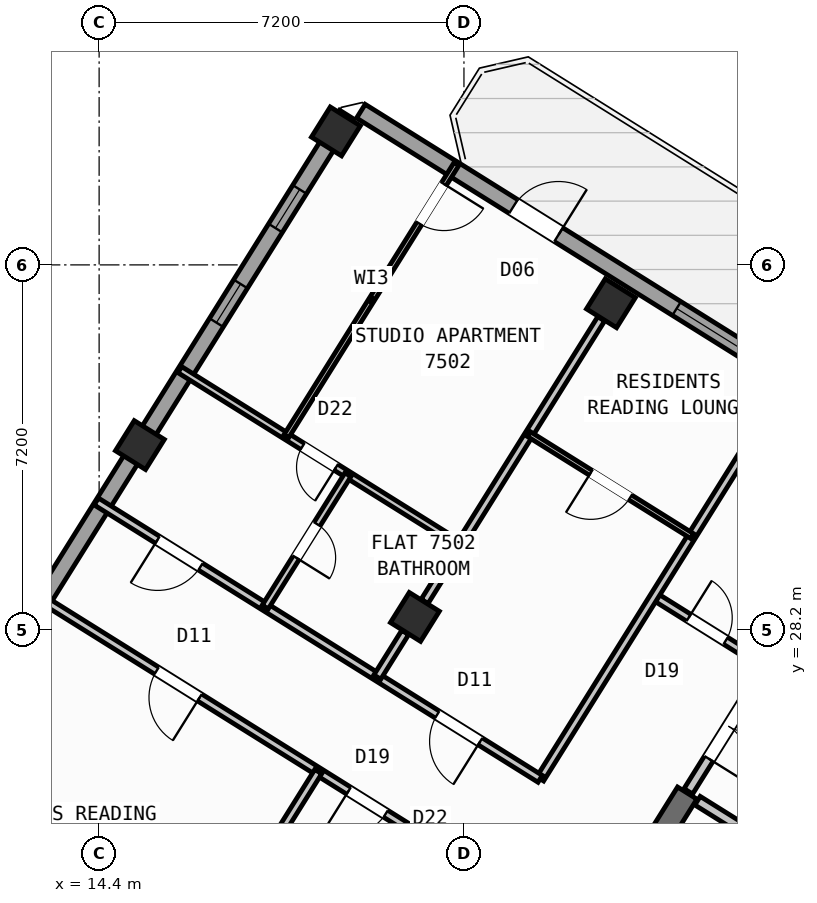
"""IFC4 building model, lengths in metres.
Left out: names, types, materials, properties, quantities, classifications, styles, units other than length and angle.
Written with IfcOpenShell. Run it as: python <this file> out.ifc"""

import sys

from ifc_helpers import new_model, si_unit, direction, frame, frame_2d, origin, origin_2d, place, context, subcontext, project, spatial, rectangle, hollow_rectangle, extrude, source, transform, mapped, element, fill, save


model = new_model("IFC4")
c1 = context("Model", 3, precision=1e-05, world=origin(), true_north=direction((0.0, 1.0)))
c2 = subcontext(c1, "Body", "Model", "MODEL_VIEW")
j1 = project(units=[si_unit("LENGTHUNIT", "METRE"), si_unit("PLANEANGLEUNIT", "RADIAN")], contexts=[c1])
p1 = place(None, origin())
s1 = spatial("IfcSite", under=j1, at=p1, CompositionType="ELEMENT")
p2 = place(p1, origin())
s2 = spatial("IfcBuilding", under=s1, at=p2, CompositionType="ELEMENT")
p3 = place(p2, frame((0.0, 0.0, 295.2)))
s3 = spatial("IfcBuildingStorey", under=s2, at=p3, CompositionType="ELEMENT", Elevation=295.2)
p4 = place(p3, frame((26.007, 24.976, 0.0), z_axis=(0.0, 0.0, 1.0), x_axis=(-0.529931155655, -0.848040665456, 0.0)))
e1 = element("IfcWall", 1, at=p4, inside=s3, PredefinedType="SHEAR", context=c2, shape_type="SweptSolid", body=[
    extrude(rectangle(XDim=6.475, YDim=0.45, at=frame_2d((3.238, 0.0))), origin(), (0.0, 0.0, 1.0), 3.32),
])
m1 = source(origin(), c2, "Body", "SweptSolid", [
    extrude(hollow_rectangle(XDim=0.7, YDim=0.7, WallThickness=0.028, at=origin_2d()), origin(), (0.0, 0.0, 1.0), 3.6),
])
for number, where, z_axis, x_axis in (
    (2, (24.5, 34.643, 0.0), (0.0, 0.0, 1.0), (-0.848, 0.53, 0.0)),
    (3, (20.632, 28.452, 0.0), (0.0, 0.0, 1.0), (-0.848, 0.53, 0.0)),
    (4, (19.073, 38.034, 0.0), (0.0, 0.0, 1.0), (-0.848, 0.53, 0.0)),
    (5, (15.205, 31.844, 0.0), (0.0, 0.0, 1.0), (-0.848, 0.53, 0.0)),
):
    element("IfcColumn", number, at=place(p3, frame(where, z_axis=z_axis, x_axis=x_axis)), inside=s3, PredefinedType="COLUMN", context=c2, shape_type="MappedRepresentation", body=[
        mapped(m1, transform((0.0, 0.0, 0.0), scale=1.0)),
    ])
p5 = place(p3, frame((7.842, 20.061, 0.0), z_axis=(0.0, 0.0, 1.0), x_axis=(0.529915577903, 0.84805039962, 0.0)))
e6 = element("IfcWall", 6, at=p5, inside=s3, PredefinedType="STANDARD", context=c2, shape_type="SweptSolid", body=[
    extrude(rectangle(XDim=21.587, YDim=0.32, at=frame_2d((10.794, 0.0))), origin(), (0.0, 0.0, 1.0), 3.32),
])
p6 = place(p5, frame((1.368, 0.0, 0.9)))
e7 = element("IfcOpeningElement", 7, at=p6, cuts=e6, PredefinedType="OPENING", context=c2, shape_type="SweptSolid", body=[
    extrude(rectangle(XDim=1.65, YDim=1.45, at=frame_2d((0.825, 0.725))), frame((0.0, 0.17, 0.0), z_axis=(0.0, -1.0, 0.0), x_axis=(1.0, 0.0, 0.0)), (0.0, 0.0, 1.0), 0.34),
])
p7 = place(p5, frame((4.71, 0.0, 1.0)))
e8 = element("IfcOpeningElement", 8, at=p7, cuts=e6, PredefinedType="OPENING", context=c2, shape_type="SweptSolid", body=[
    extrude(rectangle(XDim=0.9, YDim=1.25, at=frame_2d((0.45, 0.625))), frame((0.0, 0.17, 0.0), z_axis=(0.0, -1.0, 0.0), x_axis=(1.0, 0.0, 0.0)), (0.0, 0.0, 1.0), 0.34),
])
p8 = place(p5, frame((7.554, 0.0, 0.95)))
e9 = element("IfcOpeningElement", 9, at=p8, cuts=e6, PredefinedType="OPENING", context=c2, shape_type="SweptSolid", body=[
    extrude(rectangle(XDim=1.95, YDim=1.35, at=frame_2d((0.975, 0.675))), frame((0.0, 0.17, 0.0), z_axis=(0.0, -1.0, 0.0), x_axis=(1.0, 0.0, 0.0)), (0.0, 0.0, 1.0), 0.34),
])
p9 = place(p5, frame((16.744, 0.0, 1.0)))
e10 = element("IfcOpeningElement", 10, at=p9, cuts=e6, PredefinedType="OPENING", context=c2, shape_type="SweptSolid", body=[
    extrude(rectangle(XDim=0.9, YDim=1.25, at=frame_2d((0.45, 0.625))), frame((0.0, 0.17, 0.0), z_axis=(0.0, -1.0, 0.0), x_axis=(1.0, 0.0, 0.0)), (0.0, 0.0, 1.0), 0.34),
])
p10 = place(p5, frame((18.944, 0.0, 1.0)))
e11 = element("IfcOpeningElement", 11, at=p10, cuts=e6, PredefinedType="OPENING", context=c2, shape_type="SweptSolid", body=[
    extrude(rectangle(XDim=0.9, YDim=1.25, at=frame_2d((0.45, 0.625))), frame((0.0, 0.17, 0.0), z_axis=(0.0, -1.0, 0.0), x_axis=(1.0, 0.0, 0.0)), (0.0, 0.0, 1.0), 0.34),
])
p11 = place(p3, frame((19.566, 38.434, 0.0), z_axis=(0.0, 0.0, 1.0), x_axis=(0.84804567626, -0.529923136858, 0.0)))
e12 = element("IfcWall", 12, at=p11, inside=s3, PredefinedType="STANDARD", context=c2, shape_type="SweptSolid", body=[
    extrude(rectangle(XDim=25.188, YDim=0.32, at=frame_2d((12.594, 0.0))), origin(), (0.0, 0.0, 1.0), 3.32),
])
p12 = place(p11, frame((3.55, 0.0, 0.0)))
e13 = element("IfcOpeningElement", 13, at=p12, cuts=e12, PredefinedType="OPENING", context=c2, shape_type="SweptSolid", body=[
    extrude(rectangle(XDim=1.05, YDim=2.15, at=frame_2d((0.525, 1.075))), frame((0.0, 0.17, 0.0), z_axis=(0.0, -1.0, 0.0), x_axis=(1.0, 0.0, 0.0)), (0.0, 0.0, 1.0), 0.34),
])
p13 = place(p11, frame((7.349, 0.0, 0.9)))
e14 = element("IfcOpeningElement", 14, at=p13, cuts=e12, PredefinedType="OPENING", context=c2, shape_type="SweptSolid", body=[
    extrude(rectangle(XDim=1.65, YDim=1.45, at=frame_2d((0.825, 0.725))), frame((0.0, 0.17, 0.0), z_axis=(0.0, -1.0, 0.0), x_axis=(1.0, 0.0, 0.0)), (0.0, 0.0, 1.0), 0.34),
])
p14 = place(p11, frame((10.754, 0.0, 1.0)))
e15 = element("IfcOpeningElement", 15, at=p14, cuts=e12, PredefinedType="OPENING", context=c2, shape_type="SweptSolid", body=[
    extrude(rectangle(XDim=0.9, YDim=1.25, at=frame_2d((0.45, 0.625))), frame((0.0, 0.17, 0.0), z_axis=(0.0, -1.0, 0.0), x_axis=(1.0, 0.0, 0.0)), (0.0, 0.0, 1.0), 0.34),
])
p15 = place(p11, frame((15.169, 0.0, 0.95)))
e16 = element("IfcOpeningElement", 16, at=p15, cuts=e12, PredefinedType="OPENING", context=c2, shape_type="SweptSolid", body=[
    extrude(rectangle(XDim=1.95, YDim=1.35, at=frame_2d((0.975, 0.675))), frame((0.0, 0.17, 0.0), z_axis=(0.0, -1.0, 0.0), x_axis=(1.0, 0.0, 0.0)), (0.0, 0.0, 1.0), 0.34),
])
p16 = place(p11, frame((20.869, 0.0, 0.95)))
e17 = element("IfcOpeningElement", 17, at=p16, cuts=e12, PredefinedType="OPENING", context=c2, shape_type="SweptSolid", body=[
    extrude(rectangle(XDim=1.95, YDim=1.35, at=frame_2d((0.975, 0.675))), frame((0.0, 0.17, 0.0), z_axis=(0.0, -1.0, 0.0), x_axis=(1.0, 0.0, 0.0)), (0.0, 0.0, 1.0), 0.34),
])
p17 = place(p3, frame((31.525, 21.504, 0.0), z_axis=(0.0, 0.0, 1.0), x_axis=(-0.848042066329, 0.529928913853, 0.0)))
e18 = element("IfcWall", 18, at=p17, inside=s3, PredefinedType="STANDARD", context=c2, shape_type="SweptSolid", body=[
    extrude(rectangle(XDim=6.268, YDim=0.2, at=frame_2d((3.134, 0.0))), origin(), (0.0, 0.0, 1.0), 3.31),
])
p18 = place(p17, frame((4.4, 0.0, 0.0)))
e19 = element("IfcOpeningElement", 19, at=p18, cuts=e18, PredefinedType="OPENING", context=c2, shape_type="SweptSolid", body=[
    extrude(rectangle(XDim=0.86, YDim=2.05, at=frame_2d((0.43, 1.025))), frame((0.0, 0.11, 0.0), z_axis=(0.0, -1.0, 0.0), x_axis=(1.0, 0.0, 0.0)), (0.0, 0.0, 1.0), 0.22),
])
p19 = place(p17, frame((0.35, 0.0, 0.0)))
e20 = element("IfcOpeningElement", 20, at=p19, cuts=e18, PredefinedType="OPENING", context=c2, shape_type="SweptSolid", body=[
    extrude(rectangle(XDim=0.86, YDim=2.05, at=frame_2d((0.43, 1.025))), frame((0.0, 0.11, 0.0), z_axis=(0.0, -1.0, 0.0), x_axis=(1.0, 0.0, 0.0)), (0.0, 0.0, 1.0), 0.22),
])
p20 = place(p3, frame((27.596, 27.52, 0.0), z_axis=(0.0, 0.0, 1.0), x_axis=(-0.529865479138, -0.848081702443, 0.0)))
e21 = element("IfcWall", 21, at=p20, inside=s3, PredefinedType="STANDARD", context=c2, shape_type="SweptSolid", body=[
    extrude(rectangle(XDim=2.96, YDim=0.2, at=frame_2d((1.48, 0.0))), origin(), (0.0, 0.0, 1.0), 3.31),
])
p21 = place(p20, frame((0.7, 0.0, 0.0)))
e22 = element("IfcOpeningElement", 22, at=p21, cuts=e21, PredefinedType="OPENING", context=c2, shape_type="SweptSolid", body=[
    extrude(rectangle(XDim=1.5, YDim=2.15, at=frame_2d((0.75, 1.075))), frame((0.0, 0.11, 0.0), z_axis=(0.0, -1.0, 0.0), x_axis=(1.0, 0.0, 0.0)), (0.0, 0.0, 1.0), 0.22),
])
p22 = place(p3, frame((27.57, 27.478, 0.0), z_axis=(0.0, 0.0, 1.0), x_axis=(-0.848050851465, 0.529914854792, 0.0)))
e23 = element("IfcWall", 23, at=p22, inside=s3, PredefinedType="PARTITIONING", context=c2, shape_type="SweptSolid", body=[
    extrude(rectangle(XDim=2.61, YDim=0.16, at=frame_2d((1.305, 0.0))), origin(), (0.0, 0.0, 1.0), 3.31),
])
p23 = place(p22, frame((0.95, 0.0, 0.0)))
e24 = element("IfcOpeningElement", 24, at=p23, cuts=e23, PredefinedType="OPENING", context=c2, shape_type="SweptSolid", body=[
    extrude(rectangle(XDim=0.86, YDim=2.05, at=frame_2d((0.43, 1.025))), frame((0.0, 0.09, 0.0), z_axis=(0.0, -1.0, 0.0), x_axis=(1.0, 0.0, 0.0)), (0.0, 0.0, 1.0), 0.18),
])
p24 = place(p3, frame((27.953, 33.016, 0.0), z_axis=(0.0, 0.0, 1.0), x_axis=(-0.529903001606, -0.848058257957, 0.0)))
e25 = element("IfcWall", 25, at=p24, inside=s3, PredefinedType="PARTITIONING", context=c2, shape_type="SweptSolid", body=[
    extrude(rectangle(XDim=9.15, YDim=0.16, at=frame_2d((4.575, 0.0))), origin(), (0.0, 0.0, 1.0), 3.31),
])
p25 = place(p3, frame((23.104, 25.256, 0.0), z_axis=(0.0, 0.0, 1.0), x_axis=(-0.848043444964, 0.529926707624, 0.0)))
e26 = element("IfcWall", 26, at=p25, inside=s3, PredefinedType="PARTITIONING", context=c2, shape_type="SweptSolid", body=[
    extrude(rectangle(XDim=10.33, YDim=0.16, at=frame_2d((5.165, 0.0))), origin(), (0.0, 0.0, 1.0), 3.31),
])
p26 = place(p25, frame((1.395, 0.0, 0.0)))
e27 = element("IfcOpeningElement", 27, at=p26, cuts=e26, PredefinedType="OPENING", context=c2, shape_type="SweptSolid", body=[
    extrude(rectangle(XDim=1.0, YDim=2.1, at=frame_2d((0.5, 1.05))), frame((0.0, 0.09, 0.0), z_axis=(0.0, -1.0, 0.0), x_axis=(1.0, 0.0, 0.0)), (0.0, 0.0, 1.0), 0.18),
])
p27 = place(p25, frame((7.904, 0.0, 0.0)))
e28 = element("IfcOpeningElement", 28, at=p27, cuts=e26, PredefinedType="OPENING", context=c2, shape_type="SweptSolid", body=[
    extrude(rectangle(XDim=1.0, YDim=2.1, at=frame_2d((0.5, 1.05))), frame((0.0, 0.09, 0.0), z_axis=(0.0, -1.0, 0.0), x_axis=(1.0, 0.0, 0.0)), (0.0, 0.0, 1.0), 0.18),
])
p28 = place(p3, frame((21.938, 23.391, 0.0), z_axis=(0.0, 0.0, 1.0), x_axis=(-0.848050081784, 0.529916086552, 0.0)))
e29 = element("IfcWall", 29, at=p28, inside=s3, PredefinedType="PARTITIONING", context=c2, shape_type="SweptSolid", body=[
    extrude(rectangle(XDim=10.33, YDim=0.16, at=frame_2d((5.165, 0.0))), origin(), (0.0, 0.0, 1.0), 3.31),
])
p29 = place(p28, frame((2.22, 0.0, 0.0)))
e30 = element("IfcOpeningElement", 30, at=p29, cuts=e29, PredefinedType="OPENING", context=c2, shape_type="SweptSolid", body=[
    extrude(rectangle(XDim=0.86, YDim=2.05, at=frame_2d((0.43, 1.025))), frame((0.0, 0.09, 0.0), z_axis=(0.0, -1.0, 0.0), x_axis=(1.0, 0.0, 0.0)), (0.0, 0.0, 1.0), 0.18),
])
p30 = place(p28, frame((6.55, 0.0, 0.0)))
e31 = element("IfcOpeningElement", 31, at=p30, cuts=e29, PredefinedType="OPENING", context=c2, shape_type="SweptSolid", body=[
    extrude(rectangle(XDim=1.0, YDim=2.1, at=frame_2d((0.5, 1.05))), frame((0.0, 0.09, 0.0), z_axis=(0.0, -1.0, 0.0), x_axis=(1.0, 0.0, 0.0)), (0.0, 0.0, 1.0), 0.18),
])
p31 = place(p3, frame((18.724, 25.399, 0.0), z_axis=(0.0, 0.0, 1.0), x_axis=(-0.529952920244, -0.848027064618, 0.0)))
e32 = element("IfcWall", 32, at=p31, inside=s3, PredefinedType="PARTITIONING", context=c2, shape_type="SweptSolid", body=[
    extrude(rectangle(XDim=3.338, YDim=0.16, at=frame_2d((1.669, 0.0))), origin(), (0.0, 0.0, 1.0), 3.31),
])
p32 = place(p3, frame((24.309, 34.336, 0.0), z_axis=(0.0, 0.0, 1.0), x_axis=(-0.529895484599, -0.848062954858, 0.0)))
e33 = element("IfcWall", 33, at=p32, inside=s3, PredefinedType="PARTITIONING", context=c2, shape_type="SweptSolid", body=[
    extrude(rectangle(XDim=6.576, YDim=0.16, at=frame_2d((3.288, 0.0))), origin(), (0.0, 0.0, 1.0), 3.31),
])
p33 = place(p3, frame((20.44, 28.145, 0.0), z_axis=(0.0, 0.0, 1.0), x_axis=(-0.529977795385, -0.848011519025, 0.0)))
e34 = element("IfcWall", 34, at=p33, inside=s3, PredefinedType="PARTITIONING", context=c2, shape_type="SweptSolid", body=[
    extrude(rectangle(XDim=1.038, YDim=0.16, at=frame_2d((0.519, 0.0))), origin(), (0.0, 0.0, 1.0), 3.31),
])
p34 = place(p3, frame((26.099, 30.05, 0.0), z_axis=(0.0, 0.0, 1.0), x_axis=(-0.84803087207, 0.529946827537, 0.0)))
e35 = element("IfcWall", 35, at=p34, inside=s3, PredefinedType="PARTITIONING", context=c2, shape_type="SweptSolid", body=[
    extrude(rectangle(XDim=3.79, YDim=0.11, at=frame_2d((1.895, 0.0))), origin(), (0.0, 0.0, 1.0), 3.31),
])
p35 = place(p34, frame((1.435, 0.0, 0.0)))
e36 = element("IfcOpeningElement", 36, at=p35, cuts=e35, PredefinedType="OPENING", context=c2, shape_type="SweptSolid", body=[
    extrude(rectangle(XDim=0.92, YDim=2.08, at=frame_2d((0.46, 1.04))), frame((0.0, 0.065, 0.0), z_axis=(0.0, -1.0, 0.0), x_axis=(1.0, 0.0, 0.0)), (0.0, 0.0, 1.0), 0.13),
])
p36 = place(p3, frame((21.522, 29.877, 0.0), z_axis=(0.0, 0.0, 1.0), x_axis=(-0.848048787466, 0.529918157905, 0.0)))
e37 = element("IfcWall", 37, at=p36, inside=s3, PredefinedType="PLUMBINGWALL", context=c2, shape_type="SweptSolid", body=[
    extrude(rectangle(XDim=6.52, YDim=0.14, at=frame_2d((3.26, 0.0))), origin(), (0.0, 0.0, 1.0), 3.31),
])
p37 = place(p36, frame((2.885, 0.0, 0.0)))
e38 = element("IfcOpeningElement", 38, at=p37, cuts=e37, PredefinedType="OPENING", context=c2, shape_type="SweptSolid", body=[
    extrude(rectangle(XDim=0.78, YDim=2.05, at=frame_2d((0.39, 1.025))), frame((0.0, 0.08, 0.0), z_axis=(0.0, -1.0, 0.0), x_axis=(1.0, 0.0, 0.0)), (0.0, 0.0, 1.0), 0.16),
])
p38 = place(p3, frame((19.311, 31.259, 0.0), z_axis=(0.0, 0.0, 1.0), x_axis=(-0.52989206052, -0.848065094316, 0.0)))
e39 = element("IfcWall", 39, at=p38, inside=s3, PredefinedType="PLUMBINGWALL", context=c2, shape_type="SweptSolid", body=[
    extrude(rectangle(XDim=3.08, YDim=0.14, at=frame_2d((1.54, 0.0))), origin(), (0.0, 0.0, 1.0), 3.31),
])
p39 = place(p38, frame((1.15, 0.0, 0.0)))
e40 = element("IfcOpeningElement", 40, at=p39, cuts=e39, PredefinedType="OPENING", context=c2, shape_type="SweptSolid", body=[
    extrude(rectangle(XDim=0.78, YDim=2.05, at=frame_2d((0.39, 1.025))), frame((0.0, 0.08, 0.0), z_axis=(0.0, -1.0, 0.0), x_axis=(1.0, 0.0, 0.0)), (0.0, 0.0, 1.0), 0.16),
])
p40 = place(p3, frame((21.454, 37.395, 0.0), z_axis=(0.0, 0.0, 1.0), x_axis=(-0.529922785174, -0.848045896018, 0.0)))
e41 = element("IfcWall", 41, at=p40, inside=s3, PredefinedType="PARTITIONING", context=c2, shape_type="SweptSolid", body=[
    extrude(rectangle(XDim=6.34, YDim=0.11, at=frame_2d((3.17, 0.0))), origin(), (0.0, 0.0, 1.0), 3.31),
])
p41 = place(p40, frame((0.47, 0.0, 0.0)))
e42 = element("IfcOpeningElement", 42, at=p41, cuts=e41, PredefinedType="OPENING", context=c2, shape_type="SweptSolid", body=[
    extrude(rectangle(XDim=0.92, YDim=2.08, at=frame_2d((0.46, 1.04))), frame((0.0, 0.065, 0.0), z_axis=(0.0, -1.0, 0.0), x_axis=(1.0, 0.0, 0.0)), (0.0, 0.0, 1.0), 0.13),
])
m2 = source(origin(), c2, "Body", "SweptSolid", [
    extrude(rectangle(XDim=1.05, YDim=2.15, at=frame_2d((0.525, 1.075))), frame((0.0, 0.025, 0.0), z_axis=(0.0, -1.0, 0.0), x_axis=(1.0, 0.0, 0.0)), (0.0, 0.0, 1.0), 0.05),
])
p42 = place(p12, origin())
e43 = element("IfcDoor", 43, at=p42, inside=s3, OperationType="SINGLE_SWING_RIGHT", PredefinedType="DOOR", context=c2, shape_type="MappedRepresentation", body=[
    mapped(m2, transform((0.0, 0.0, 0.0), scale=1.0)),
])
fill(e13, e43)
m3 = source(origin(), c2, "Body", "SweptSolid", [
    extrude(rectangle(XDim=0.9, YDim=1.25, at=frame_2d((0.45, 0.625))), frame((0.0, 0.03, 0.0), z_axis=(0.0, -1.0, 0.0), x_axis=(1.0, 0.0, 0.0)), (0.0, 0.0, 1.0), 0.06),
])
p43 = place(p9, origin())
e44 = element("IfcWindow", 44, at=p43, inside=s3, PartitioningType="SINGLE_PANEL", PredefinedType="WINDOW", context=c2, shape_type="MappedRepresentation", body=[
    mapped(m3, transform((0.0, 0.0, 0.0), scale=1.0)),
])
fill(e10, e44)
p44 = place(p10, origin())
e45 = element("IfcWindow", 45, at=p44, inside=s3, PartitioningType="SINGLE_PANEL", PredefinedType="WINDOW", context=c2, shape_type="MappedRepresentation", body=[
    mapped(m3, transform((0.0, 0.0, 0.0), scale=1.0)),
])
fill(e11, e45)
m4 = source(origin(), c2, "Body", "SweptSolid", [
    extrude(rectangle(XDim=1.65, YDim=1.45, at=frame_2d((0.825, 0.725))), frame((0.0, 0.03, 0.0), z_axis=(0.0, -1.0, 0.0), x_axis=(1.0, 0.0, 0.0)), (0.0, 0.0, 1.0), 0.06),
])
p45 = place(p13, origin())
e46 = element("IfcWindow", 46, at=p45, inside=s3, PartitioningType="SINGLE_PANEL", PredefinedType="WINDOW", context=c2, shape_type="MappedRepresentation", body=[
    mapped(m4, transform((0.0, 0.0, 0.0), scale=1.0)),
])
fill(e14, e46)
m5 = source(origin(), c2, "Body", "SweptSolid", [
    extrude(rectangle(XDim=0.86, YDim=2.05, at=frame_2d((0.43, 1.025))), frame((0.0, 0.025, 0.0), z_axis=(0.0, -1.0, 0.0), x_axis=(1.0, 0.0, 0.0)), (0.0, 0.0, 1.0), 0.05),
])
p46 = place(p23, frame((0.86, 0.0, 0.0), z_axis=(0.0, 0.0, 1.0), x_axis=(-1.0, 0.0, 0.0)))
e47 = element("IfcDoor", 47, at=p46, inside=s3, OperationType="SINGLE_SWING_LEFT", PredefinedType="DOOR", context=c2, shape_type="MappedRepresentation", body=[
    mapped(m5, transform((0.0, 0.0, 0.0), scale=1.0)),
])
fill(e24, e47)
m6 = source(origin(), c2, "Body", "SweptSolid", [
    extrude(rectangle(XDim=1.5, YDim=2.15, at=frame_2d((0.75, 1.075))), frame((0.0, 0.025, 0.0), z_axis=(0.0, -1.0, 0.0), x_axis=(1.0, 0.0, 0.0)), (0.0, 0.0, 1.0), 0.05),
])
p47 = place(p21, origin())
e48 = element("IfcDoor", 48, at=p47, inside=s3, OperationType="DOUBLE_DOOR_SINGLE_SWING", PredefinedType="DOOR", context=c2, shape_type="MappedRepresentation", body=[
    mapped(m6, transform((0.0, 0.0, 0.0), scale=1.0)),
])
fill(e22, e48)
p48 = place(p29, origin())
e49 = element("IfcDoor", 49, at=p48, inside=s3, OperationType="SINGLE_SWING_RIGHT", PredefinedType="DOOR", context=c2, shape_type="MappedRepresentation", body=[
    mapped(m5, transform((0.0, 0.0, 0.0), scale=1.0)),
])
fill(e30, e49)
m7 = source(origin(), c2, "Body", "SweptSolid", [
    extrude(rectangle(XDim=1.0, YDim=2.1, at=frame_2d((0.5, 1.05))), frame((0.0, 0.025, 0.0), z_axis=(0.0, -1.0, 0.0), x_axis=(1.0, 0.0, 0.0)), (0.0, 0.0, 1.0), 0.05),
])
p49 = place(p30, origin())
e50 = element("IfcDoor", 50, at=p49, inside=s3, OperationType="SINGLE_SWING_LEFT", PredefinedType="DOOR", context=c2, shape_type="MappedRepresentation", body=[
    mapped(m7, transform((0.0, 0.0, 0.0), scale=1.0)),
])
fill(e31, e50)
p50 = place(p26, origin())
e51 = element("IfcDoor", 51, at=p50, inside=s3, OperationType="SINGLE_SWING_LEFT", PredefinedType="DOOR", context=c2, shape_type="MappedRepresentation", body=[
    mapped(m7, transform((0.0, 0.0, 0.0), scale=1.0)),
])
fill(e27, e51)
m8 = source(origin(), c2, "Body", "SweptSolid", [
    extrude(rectangle(XDim=0.92, YDim=2.08, at=frame_2d((0.46, 1.04))), frame((0.0, 0.025, 0.0), z_axis=(0.0, -1.0, 0.0), x_axis=(1.0, 0.0, 0.0)), (0.0, 0.0, 1.0), 0.05),
])
p51 = place(p35, origin())
e52 = element("IfcDoor", 52, at=p51, inside=s3, OperationType="SINGLE_SWING_RIGHT", PredefinedType="DOOR", context=c2, shape_type="MappedRepresentation", body=[
    mapped(m8, transform((0.0, 0.0, 0.0), scale=1.0)),
])
fill(e36, e52)
p52 = place(p41, origin())
e53 = element("IfcDoor", 53, at=p52, inside=s3, OperationType="SINGLE_SWING_LEFT", PredefinedType="DOOR", context=c2, shape_type="MappedRepresentation", body=[
    mapped(m8, transform((0.0, 0.0, 0.0), scale=1.0)),
])
fill(e42, e53)
p53 = place(p27, origin())
e54 = element("IfcDoor", 54, at=p53, inside=s3, OperationType="SINGLE_SWING_RIGHT", PredefinedType="DOOR", context=c2, shape_type="MappedRepresentation", body=[
    mapped(m7, transform((0.0, 0.0, 0.0), scale=1.0)),
])
fill(e28, e54)
m9 = source(origin(), c2, "Body", "SweptSolid", [
    extrude(rectangle(XDim=0.78, YDim=2.05, at=frame_2d((0.39, 1.025))), frame((0.0, 0.025, 0.0), z_axis=(0.0, -1.0, 0.0), x_axis=(1.0, 0.0, 0.0)), (0.0, 0.0, 1.0), 0.05),
])
p54 = place(p37, origin())
e55 = element("IfcDoor", 55, at=p54, inside=s3, OperationType="SINGLE_SWING_LEFT", PredefinedType="DOOR", context=c2, shape_type="MappedRepresentation", body=[
    mapped(m9, transform((0.0, 0.0, 0.0), scale=1.0)),
])
fill(e38, e55)
p55 = place(p39, origin())
e56 = element("IfcDoor", 56, at=p55, inside=s3, OperationType="SINGLE_SWING_RIGHT", PredefinedType="DOOR", context=c2, shape_type="MappedRepresentation", body=[
    mapped(m9, transform((0.0, 0.0, 0.0), scale=1.0)),
])
fill(e40, e56)
save(model, sys.argv[1])
